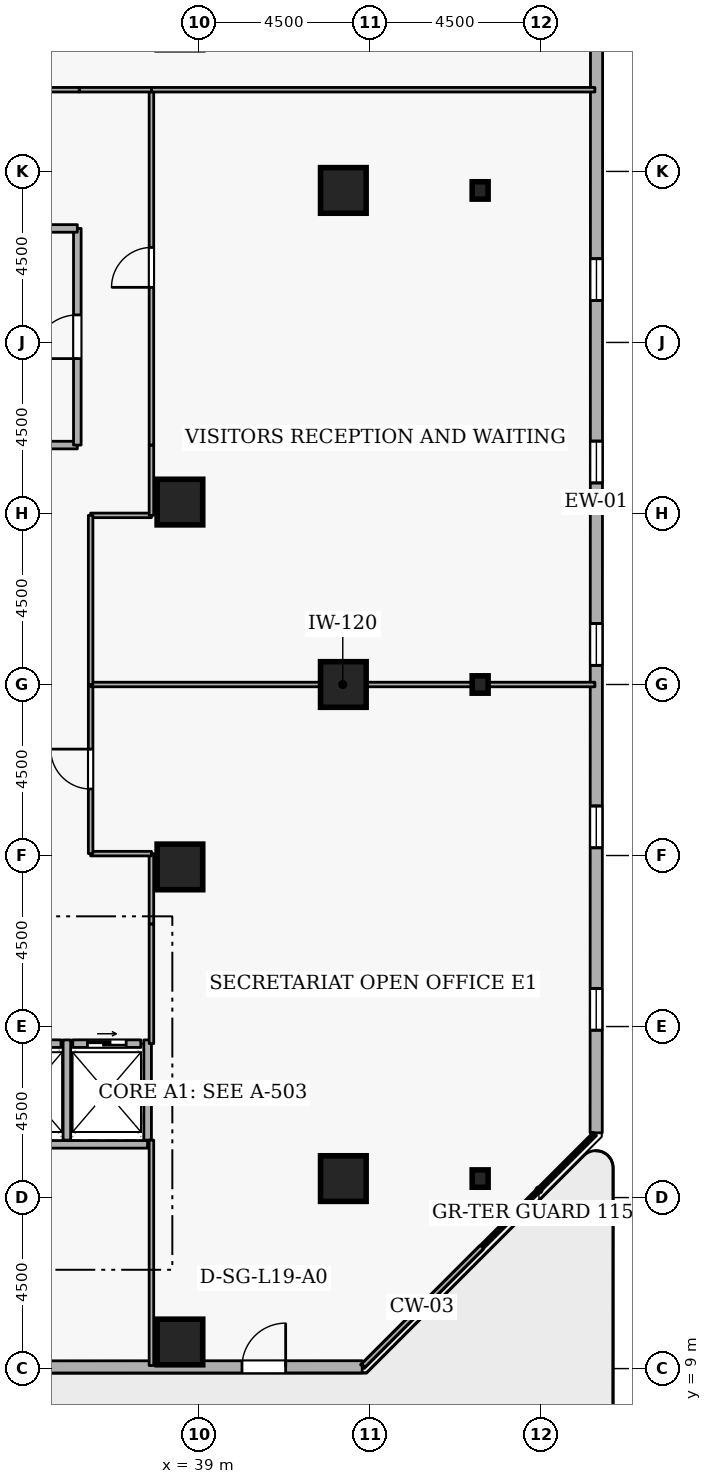
"""IFC4 building model, lengths in metres.
Left out: names, types, materials, properties, quantities, classifications, styles, units other than length and angle.
Written with IfcOpenShell. Run it as: python <this file> out.ifc"""

import sys

from ifc_helpers import new_model, si_unit, direction, frame, frame_2d, origin, origin_2d, place, context, subcontext, project, spatial, rectangle, i_section, extrude, element, fill, save


model = new_model("IFC4")
c1 = context("Model", 3, precision=1e-05, world=origin(), true_north=direction((0.0, 1.0)))
c2 = subcontext(c1, "Body", "Model", "MODEL_VIEW")
j1 = project(units=[si_unit("LENGTHUNIT", "METRE"), si_unit("PLANEANGLEUNIT", "RADIAN")], contexts=[c1])
p1 = place(None, origin())
s1 = spatial("IfcSite", under=j1, at=p1, CompositionType="ELEMENT")
p2 = place(p1, origin())
s2 = spatial("IfcBuilding", under=s1, at=p2, CompositionType="ELEMENT")
p3 = place(p2, frame((0.0, 0.0, 75.9)))
s3 = spatial("IfcBuildingStorey", under=s2, at=p3, CompositionType="ELEMENT", Elevation=75.9)
for number, where, z_axis, x_axis in (
    (1, (38.5, 9.7, 0.0), (0.0, 0.0, 1.0), (1.0, 0.0, 0.0)),
    (2, (42.8, 14.0, 0.0), (0.0, 0.0, 1.0), (1.0, 0.0, 0.0)),
    (3, (42.8, 27.0, 0.0), (0.0, 0.0, 1.0), (1.0, 0.0, 0.0)),
    (4, (42.8, 40.0, 0.0), (0.0, 0.0, 1.0), (1.0, 0.0, 0.0)),
    (5, (38.5, 22.2, 0.0), (0.0, 0.0, 1.0), (1.0, 0.0, 0.0)),
    (6, (38.5, 31.8, 0.0), (0.0, 0.0, 1.0), (1.0, 0.0, 0.0)),
):
    element("IfcColumn", number, at=place(p3, frame(where, z_axis=z_axis, x_axis=x_axis)), inside=s3, PredefinedType="COLUMN", context=c2, shape_type="SweptSolid", body=[
        extrude(rectangle(XDim=1.2, YDim=1.2, at=origin_2d()), origin(), (0.0, 0.0, 1.0), 4.2),
    ])
for number, where, z_axis, x_axis in (
    (7, (46.4, 14.0, 0.0), (0.0, 0.0, 1.0), (1.0, 0.0, 0.0)),
    (8, (46.4, 27.0, 0.0), (0.0, 0.0, 1.0), (1.0, 0.0, 0.0)),
    (9, (46.4, 40.0, 0.0), (0.0, 0.0, 1.0), (1.0, 0.0, 0.0)),
):
    element("IfcColumn", number, at=place(p3, frame(where, z_axis=z_axis, x_axis=x_axis)), inside=s3, PredefinedType="COLUMN", context=c2, shape_type="SweptSolid", body=[
        extrude(i_section(OverallWidth=0.418, OverallDepth=0.456, WebThickness=0.042, FlangeThickness=0.067, FilletRadius=0.015, at=origin_2d()), origin(), (0.0, 0.0, 1.0), 4.2),
    ])
p4 = place(p3, frame((10.119, 9.035, 0.0), z_axis=(0.0, 0.0, 1.0), x_axis=(0.99999993762, 0.000353213856, 0.0)))
e10 = element("IfcWall", 10, at=p4, inside=s3, PredefinedType="STANDARD", context=c2, shape_type="SweptSolid", body=[
    extrude(rectangle(XDim=33.177, YDim=0.32, at=frame_2d((16.589, 0.0))), origin(), (0.0, 0.0, 1.0), 3.3),
])
p5 = place(p4, frame((30.014, 0.0, 0.0)))
e11 = element("IfcOpeningElement", 11, at=p5, cuts=e10, PredefinedType="OPENING", context=c2, shape_type="SweptSolid", body=[
    extrude(rectangle(XDim=1.15, YDim=2.1, at=frame_2d((0.575, 1.05))), frame((0.0, 0.17, 0.0), z_axis=(0.0, -1.0, 0.0), x_axis=(1.0, 0.0, 0.0)), (0.0, 0.0, 1.0), 0.34),
])
p6 = place(p4, frame((7.5, 0.0, 0.72)))
e12 = element("IfcOpeningElement", 12, at=p6, cuts=e10, PredefinedType="OPENING", context=c2, shape_type="SweptSolid", body=[
    extrude(rectangle(XDim=1.1, YDim=1.8, at=frame_2d((0.55, 0.9))), frame((0.0, 0.17, 0.0), z_axis=(0.0, -1.0, 0.0), x_axis=(1.0, 0.0, 0.0)), (0.0, 0.0, 1.0), 0.34),
])
p7 = place(p4, frame((12.3, 0.0, 0.72)))
e13 = element("IfcOpeningElement", 13, at=p7, cuts=e10, PredefinedType="OPENING", context=c2, shape_type="SweptSolid", body=[
    extrude(rectangle(XDim=1.1, YDim=1.8, at=frame_2d((0.55, 0.9))), frame((0.0, 0.17, 0.0), z_axis=(0.0, -1.0, 0.0), x_axis=(1.0, 0.0, 0.0)), (0.0, 0.0, 1.0), 0.34),
])
p8 = place(p4, frame((17.1, 0.0, 0.72)))
e14 = element("IfcOpeningElement", 14, at=p8, cuts=e10, PredefinedType="OPENING", context=c2, shape_type="SweptSolid", body=[
    extrude(rectangle(XDim=1.1, YDim=1.8, at=frame_2d((0.55, 0.9))), frame((0.0, 0.17, 0.0), z_axis=(0.0, -1.0, 0.0), x_axis=(1.0, 0.0, 0.0)), (0.0, 0.0, 1.0), 0.34),
])
p9 = place(p4, frame((21.9, 0.0, 0.72)))
e15 = element("IfcOpeningElement", 15, at=p9, cuts=e10, PredefinedType="OPENING", context=c2, shape_type="SweptSolid", body=[
    extrude(rectangle(XDim=1.1, YDim=1.8, at=frame_2d((0.55, 0.9))), frame((0.0, 0.17, 0.0), z_axis=(0.0, -1.0, 0.0), x_axis=(1.0, 0.0, 0.0)), (0.0, 0.0, 1.0), 0.34),
])
p10 = place(p3, frame((49.453, 15.204, 0.0), z_axis=(0.0, 0.0, 1.0), x_axis=(0.000353213856, 0.99999993762, 0.0)))
e16 = element("IfcWall", 16, at=p10, inside=s3, PredefinedType="STANDARD", context=c2, shape_type="SweptSolid", body=[
    extrude(rectangle(XDim=33.177, YDim=0.32, at=frame_2d((16.589, 0.0))), origin(), (0.0, 0.0, 1.0), 3.3),
])
p11 = place(p10, frame((2.7, 0.0, 0.72)))
e17 = element("IfcOpeningElement", 17, at=p11, cuts=e16, PredefinedType="OPENING", context=c2, shape_type="SweptSolid", body=[
    extrude(rectangle(XDim=1.1, YDim=1.8, at=frame_2d((0.55, 0.9))), frame((0.0, 0.17, 0.0), z_axis=(0.0, -1.0, 0.0), x_axis=(1.0, 0.0, 0.0)), (0.0, 0.0, 1.0), 0.34),
])
p12 = place(p10, frame((7.5, 0.0, 0.72)))
e18 = element("IfcOpeningElement", 18, at=p12, cuts=e16, PredefinedType="OPENING", context=c2, shape_type="SweptSolid", body=[
    extrude(rectangle(XDim=1.1, YDim=1.8, at=frame_2d((0.55, 0.9))), frame((0.0, 0.17, 0.0), z_axis=(0.0, -1.0, 0.0), x_axis=(1.0, 0.0, 0.0)), (0.0, 0.0, 1.0), 0.34),
])
p13 = place(p10, frame((12.3, 0.0, 0.72)))
e19 = element("IfcOpeningElement", 19, at=p13, cuts=e16, PredefinedType="OPENING", context=c2, shape_type="SweptSolid", body=[
    extrude(rectangle(XDim=1.1, YDim=1.8, at=frame_2d((0.55, 0.9))), frame((0.0, 0.17, 0.0), z_axis=(0.0, -1.0, 0.0), x_axis=(1.0, 0.0, 0.0)), (0.0, 0.0, 1.0), 0.34),
])
p14 = place(p10, frame((17.1, 0.0, 0.72)))
e20 = element("IfcOpeningElement", 20, at=p14, cuts=e16, PredefinedType="OPENING", context=c2, shape_type="SweptSolid", body=[
    extrude(rectangle(XDim=1.1, YDim=1.8, at=frame_2d((0.55, 0.9))), frame((0.0, 0.17, 0.0), z_axis=(0.0, -1.0, 0.0), x_axis=(1.0, 0.0, 0.0)), (0.0, 0.0, 1.0), 0.34),
])
p15 = place(p10, frame((21.9, 0.0, 0.72)))
e21 = element("IfcOpeningElement", 21, at=p15, cuts=e16, PredefinedType="OPENING", context=c2, shape_type="SweptSolid", body=[
    extrude(rectangle(XDim=1.1, YDim=1.8, at=frame_2d((0.55, 0.9))), frame((0.0, 0.17, 0.0), z_axis=(0.0, -1.0, 0.0), x_axis=(1.0, 0.0, 0.0)), (0.0, 0.0, 1.0), 0.34),
])
p16 = place(p3, frame((33.63, 17.55, 0.0), z_axis=(0.0, 0.0, 1.0), x_axis=(1.0, 0.0, 0.0)))
e22 = element("IfcWall", 22, at=p16, inside=s3, PredefinedType="STANDARD", context=c2, shape_type="SweptSolid", body=[
    extrude(rectangle(XDim=1.74, YDim=0.2, at=frame_2d((0.87, 0.0))), origin(), (0.0, 0.0, 1.0), 3.94),
])
p17 = place(p16, frame((0.36, 0.0, 0.0)))
e23 = element("IfcOpeningElement", 23, at=p17, cuts=e22, PredefinedType="OPENING", context=c2, shape_type="SweptSolid", body=[
    extrude(rectangle(XDim=1.02, YDim=2.06, at=frame_2d((0.51, 1.03))), frame((0.0, 0.11, 0.0), z_axis=(0.0, -1.0, 0.0), x_axis=(1.0, 0.0, 0.0)), (0.0, 0.0, 1.0), 0.22),
])
p18 = place(p3, frame((35.68, 17.55, 0.0), z_axis=(0.0, 0.0, 1.0), x_axis=(1.0, 0.0, 0.0)))
e24 = element("IfcWall", 24, at=p18, inside=s3, PredefinedType="STANDARD", context=c2, shape_type="SweptSolid", body=[
    extrude(rectangle(XDim=1.79, YDim=0.2, at=frame_2d((0.895, 0.0))), origin(), (0.0, 0.0, 1.0), 3.94),
])
p19 = place(p18, frame((0.385, 0.0, 0.0)))
e25 = element("IfcOpeningElement", 25, at=p19, cuts=e24, PredefinedType="OPENING", context=c2, shape_type="SweptSolid", body=[
    extrude(rectangle(XDim=1.02, YDim=2.06, at=frame_2d((0.51, 1.03))), frame((0.0, 0.11, 0.0), z_axis=(0.0, -1.0, 0.0), x_axis=(1.0, 0.0, 0.0)), (0.0, 0.0, 1.0), 0.22),
])
p20 = place(p3, frame((33.452, 14.9, 0.0), z_axis=(0.0, 0.0, 1.0), x_axis=(1.0, 0.0, 0.0)))
e26 = element("IfcWall", 26, at=p20, inside=s3, PredefinedType="STANDARD", context=c2, shape_type="SweptSolid", body=[
    extrude(rectangle(XDim=4.196, YDim=0.2, at=frame_2d((2.098, 0.0))), origin(), (0.0, 0.0, 1.0), 3.94),
])
for number, where, z_axis, x_axis in (
    (27, (35.525, 15.012, 0.0), (0.0, 0.0, 1.0), (0.0, 1.0, 0.0)),
    (28, (37.65, 15.012, 0.0), (0.0, 0.0, 1.0), (0.0, 1.0, 0.0)),
):
    element("IfcWall", number, at=place(p3, frame(where, z_axis=z_axis, x_axis=x_axis)), inside=s3, PredefinedType="STANDARD", context=c2, shape_type="SweptSolid", body=[
        extrude(rectangle(XDim=2.636, YDim=0.2, at=frame_2d((1.318, 0.0))), origin(), (0.0, 0.0, 1.0), 3.94),
    ])
p21 = place(p3, frame((33.3, 33.3, 0.0), z_axis=(0.0, 0.0, 1.0), x_axis=(1.0, 0.0, 0.0)))
e29 = element("IfcWall", 29, at=p21, inside=s3, PredefinedType="STANDARD", context=c2, shape_type="SweptSolid", body=[
    extrude(rectangle(XDim=2.5, YDim=0.2, at=frame_2d((1.25, 0.0))), origin(), (0.0, 0.0, 1.0), 3.94),
])
p22 = place(p3, frame((35.8, 33.3, 0.0), z_axis=(0.0, 0.0, 1.0), x_axis=(0.0, 1.0, 0.0)))
e30 = element("IfcWall", 30, at=p22, inside=s3, PredefinedType="STANDARD", context=c2, shape_type="SweptSolid", body=[
    extrude(rectangle(XDim=5.7, YDim=0.2, at=frame_2d((2.85, 0.0))), origin(), (0.0, 0.0, 1.0), 3.94),
])
p23 = place(p22, frame((2.275, 0.0, 0.0)))
e31 = element("IfcOpeningElement", 31, at=p23, cuts=e30, PredefinedType="OPENING", context=c2, shape_type="SweptSolid", body=[
    extrude(rectangle(XDim=1.15, YDim=2.1, at=frame_2d((0.575, 1.05))), frame((0.0, 0.11, 0.0), z_axis=(0.0, -1.0, 0.0), x_axis=(1.0, 0.0, 0.0)), (0.0, 0.0, 1.0), 0.22),
])
p24 = place(p3, frame((35.8, 39.0, 0.0), z_axis=(0.0, 0.0, 1.0), x_axis=(-1.0, 0.0, 0.0)))
e32 = element("IfcWall", 32, at=p24, inside=s3, PredefinedType="STANDARD", context=c2, shape_type="SweptSolid", body=[
    extrude(rectangle(XDim=2.5, YDim=0.2, at=frame_2d((1.25, 0.0))), origin(), (0.0, 0.0, 1.0), 3.94),
])
p25 = place(p3, frame((37.75, 17.55, 0.0), z_axis=(0.0, 0.0, 1.0), x_axis=(0.0, 1.0, 0.0)))
e33 = element("IfcWall", 33, at=p25, inside=s3, PredefinedType="PARTITIONING", context=c2, shape_type="SweptSolid", body=[
    extrude(rectangle(XDim=3.15, YDim=0.12, at=frame_2d((1.575, 0.0))), origin(), (0.0, 0.0, 1.0), 3.94),
])
p26 = place(p3, frame((37.75, 20.7, 0.0), z_axis=(0.0, 0.0, 1.0), x_axis=(0.0, 1.0, 0.0)))
e34 = element("IfcWall", 34, at=p26, inside=s3, PredefinedType="PARTITIONING", context=c2, shape_type="SweptSolid", body=[
    extrude(rectangle(XDim=1.85, YDim=0.12, at=frame_2d((0.925, 0.0))), origin(), (0.0, 0.0, 1.0), 3.94),
])
p27 = place(p3, frame((37.75, 22.55, 0.0), z_axis=(0.0, 0.0, 1.0), x_axis=(-1.0, 0.0, 0.0)))
e35 = element("IfcWall", 35, at=p27, inside=s3, PredefinedType="PARTITIONING", context=c2, shape_type="SweptSolid", body=[
    extrude(rectangle(XDim=1.6, YDim=0.12, at=frame_2d((0.8, 0.0))), origin(), (0.0, 0.0, 1.0), 3.94),
])
p28 = place(p3, frame((36.15, 22.55, 0.0), z_axis=(0.0, 0.0, 1.0), x_axis=(0.0, 1.0, 0.0)))
e36 = element("IfcWall", 36, at=p28, inside=s3, PredefinedType="PARTITIONING", context=c2, shape_type="SweptSolid", body=[
    extrude(rectangle(XDim=4.45, YDim=0.12, at=frame_2d((2.225, 0.0))), origin(), (0.0, 0.0, 1.0), 3.94),
])
p29 = place(p28, frame((1.7, 0.0, 0.0)))
e37 = element("IfcOpeningElement", 37, at=p29, cuts=e36, PredefinedType="OPENING", context=c2, shape_type="SweptSolid", body=[
    extrude(rectangle(XDim=1.05, YDim=2.1, at=frame_2d((0.525, 1.05))), frame((0.0, 0.07, 0.0), z_axis=(0.0, -1.0, 0.0), x_axis=(1.0, 0.0, 0.0)), (0.0, 0.0, 1.0), 0.14),
])
p30 = place(p3, frame((36.15, 27.0, 0.0), z_axis=(0.0, 0.0, 1.0), x_axis=(1.0, 0.0, 0.0)))
e38 = element("IfcWall", 38, at=p30, inside=s3, PredefinedType="PARTITIONING", context=c2, shape_type="SweptSolid", body=[
    extrude(rectangle(XDim=13.27, YDim=0.12, at=frame_2d((6.635, 0.0))), origin(), (0.0, 0.0, 1.0), 3.482),
])
p31 = place(p3, frame((49.42, 15.175, 0.0), z_axis=(0.0, 0.0, 1.0), x_axis=(-0.707106781187, -0.707106781187, 0.0)))
e39 = element("IfcWall", 39, at=p31, inside=s3, PredefinedType="PARTITIONING", context=c2, shape_type="SweptSolid", body=[
    extrude(rectangle(XDim=8.619, YDim=0.12, at=frame_2d((4.31, 0.0))), origin(), (0.0, 0.0, 1.0), 3.94),
])
p32 = place(p3, frame((37.75, 9.08, 0.0), z_axis=(0.0, 0.0, 1.0), x_axis=(0.0, 1.0, 0.0)))
e40 = element("IfcWall", 40, at=p32, inside=s3, PredefinedType="PARTITIONING", context=c2, shape_type="SweptSolid", body=[
    extrude(rectangle(XDim=5.932, YDim=0.12, at=frame_2d((2.966, 0.0))), origin(), (0.0, 0.0, 1.0), 3.94),
])
p33 = place(p3, frame((36.15, 31.45, 0.0), z_axis=(0.0, 0.0, 1.0), x_axis=(1.0, 0.0, 0.0)))
e41 = element("IfcWall", 41, at=p33, inside=s3, PredefinedType="PARTITIONING", context=c2, shape_type="SweptSolid", body=[
    extrude(rectangle(XDim=1.6, YDim=0.12, at=frame_2d((0.8, 0.0))), origin(), (0.0, 0.0, 1.0), 3.94),
])
p34 = place(p3, frame((37.75, 31.45, 0.0), z_axis=(0.0, 0.0, 1.0), x_axis=(0.0, 1.0, 0.0)))
e42 = element("IfcWall", 42, at=p34, inside=s3, PredefinedType="PARTITIONING", context=c2, shape_type="SweptSolid", body=[
    extrude(rectangle(XDim=1.85, YDim=0.12, at=frame_2d((0.925, 0.0))), origin(), (0.0, 0.0, 1.0), 3.94),
])
p35 = place(p3, frame((37.75, 33.3, 0.0), z_axis=(0.0, 0.0, 1.0), x_axis=(0.0, 1.0, 0.0)))
e43 = element("IfcWall", 43, at=p35, inside=s3, PredefinedType="PARTITIONING", context=c2, shape_type="SweptSolid", body=[
    extrude(rectangle(XDim=9.35, YDim=0.12, at=frame_2d((4.675, 0.0))), origin(), (0.0, 0.0, 1.0), 3.94),
])
p36 = place(p35, frame((4.15, 0.0, 0.0)))
e44 = element("IfcOpeningElement", 44, at=p36, cuts=e43, PredefinedType="OPENING", context=c2, shape_type="SweptSolid", body=[
    extrude(rectangle(XDim=1.05, YDim=2.1, at=frame_2d((0.525, 1.05))), frame((0.0, 0.07, 0.0), z_axis=(0.0, -1.0, 0.0), x_axis=(1.0, 0.0, 0.0)), (0.0, 0.0, 1.0), 0.14),
])
p37 = place(p3, frame((37.75, 42.65, 0.0), z_axis=(0.0, 0.0, 1.0), x_axis=(1.0, 0.0, 0.0)))
e45 = element("IfcWall", 45, at=p37, inside=s3, PredefinedType="PARTITIONING", context=c2, shape_type="SweptSolid", body=[
    extrude(rectangle(XDim=11.67, YDim=0.12, at=frame_2d((5.835, 0.0))), origin(), (0.0, 0.0, 1.0), 3.94),
])
p38 = place(p3, frame((36.15, 27.0, 0.0), z_axis=(0.0, 0.0, 1.0), x_axis=(0.0, 1.0, 0.0)))
e46 = element("IfcWall", 46, at=p38, inside=s3, PredefinedType="PARTITIONING", context=c2, shape_type="SweptSolid", body=[
    extrude(rectangle(XDim=4.45, YDim=0.12, at=frame_2d((2.225, 0.0))), origin(), (0.0, 0.0, 1.0), 3.94),
])
p39 = place(p3, frame((37.75, 42.65, 0.0), z_axis=(0.0, 0.0, 1.0), x_axis=(-1.0, 0.0, 0.0)))
e47 = element("IfcWall", 47, at=p39, inside=s3, PredefinedType="PARTITIONING", context=c2, shape_type="SweptSolid", body=[
    extrude(rectangle(XDim=1.9, YDim=0.12, at=frame_2d((0.95, 0.0))), origin(), (0.0, 0.0, 1.0), 3.495),
])
p40 = place(p3, frame((35.85, 42.65, 0.0), z_axis=(0.0, 0.0, 1.0), x_axis=(-1.0, 0.0, 0.0)))
e48 = element("IfcWall", 48, at=p40, inside=s3, PredefinedType="PARTITIONING", context=c2, shape_type="SweptSolid", body=[
    extrude(rectangle(XDim=10.35, YDim=0.12, at=frame_2d((5.175, 0.0))), origin(), (0.0, 0.0, 1.0), 3.495),
])
p41 = place(p40, frame((4.65, 0.0, 0.0)))
e49 = element("IfcOpeningElement", 49, at=p41, cuts=e48, PredefinedType="OPENING", context=c2, shape_type="SweptSolid", body=[
    extrude(rectangle(XDim=1.05, YDim=2.1, at=frame_2d((0.525, 1.05))), frame((0.0, 0.07, 0.0), z_axis=(0.0, -1.0, 0.0), x_axis=(1.0, 0.0, 0.0)), (0.0, 0.0, 1.0), 0.14),
])
p42 = place(p5, origin())
e50 = element("IfcDoor", 50, at=p42, inside=s3, OperationType="SINGLE_SWING_RIGHT", PredefinedType="DOOR", context=c2, shape_type="SweptSolid", body=[
    extrude(rectangle(XDim=1.15, YDim=2.1, at=frame_2d((0.575, 1.05))), frame((0.0, 0.025, 0.0), z_axis=(0.0, -1.0, 0.0), x_axis=(1.0, 0.0, 0.0)), (0.0, 0.0, 1.0), 0.05),
])
fill(e11, e50)
p43 = place(p11, origin())
e51 = element("IfcWindow", 51, at=p43, inside=s3, PartitioningType="SINGLE_PANEL", PredefinedType="WINDOW", context=c2, shape_type="SweptSolid", body=[
    extrude(rectangle(XDim=1.1, YDim=1.8, at=frame_2d((0.55, 0.9))), frame((0.0, 0.03, 0.0), z_axis=(0.0, -1.0, 0.0), x_axis=(1.0, 0.0, 0.0)), (0.0, 0.0, 1.0), 0.06),
])
fill(e17, e51)
p44 = place(p12, origin())
e52 = element("IfcWindow", 52, at=p44, inside=s3, PartitioningType="SINGLE_PANEL", PredefinedType="WINDOW", context=c2, shape_type="SweptSolid", body=[
    extrude(rectangle(XDim=1.1, YDim=1.8, at=frame_2d((0.55, 0.9))), frame((0.0, 0.03, 0.0), z_axis=(0.0, -1.0, 0.0), x_axis=(1.0, 0.0, 0.0)), (0.0, 0.0, 1.0), 0.06),
])
fill(e18, e52)
p45 = place(p13, origin())
e53 = element("IfcWindow", 53, at=p45, inside=s3, PartitioningType="SINGLE_PANEL", PredefinedType="WINDOW", context=c2, shape_type="SweptSolid", body=[
    extrude(rectangle(XDim=1.1, YDim=1.8, at=frame_2d((0.55, 0.9))), frame((0.0, 0.03, 0.0), z_axis=(0.0, -1.0, 0.0), x_axis=(1.0, 0.0, 0.0)), (0.0, 0.0, 1.0), 0.06),
])
fill(e19, e53)
p46 = place(p14, origin())
e54 = element("IfcWindow", 54, at=p46, inside=s3, PartitioningType="SINGLE_PANEL", PredefinedType="WINDOW", context=c2, shape_type="SweptSolid", body=[
    extrude(rectangle(XDim=1.1, YDim=1.8, at=frame_2d((0.55, 0.9))), frame((0.0, 0.03, 0.0), z_axis=(0.0, -1.0, 0.0), x_axis=(1.0, 0.0, 0.0)), (0.0, 0.0, 1.0), 0.06),
])
fill(e20, e54)
p47 = place(p15, origin())
e55 = element("IfcWindow", 55, at=p47, inside=s3, PartitioningType="SINGLE_PANEL", PredefinedType="WINDOW", context=c2, shape_type="SweptSolid", body=[
    extrude(rectangle(XDim=1.1, YDim=1.8, at=frame_2d((0.55, 0.9))), frame((0.0, 0.03, 0.0), z_axis=(0.0, -1.0, 0.0), x_axis=(1.0, 0.0, 0.0)), (0.0, 0.0, 1.0), 0.06),
])
fill(e21, e55)
p48 = place(p19, origin())
e56 = element("IfcDoor", 56, at=p48, inside=s3, OperationType="SLIDING_TO_LEFT", PredefinedType="DOOR", context=c2, shape_type="SweptSolid", body=[
    extrude(rectangle(XDim=1.02, YDim=2.06, at=frame_2d((0.51, 1.03))), frame((0.0, 0.025, 0.0), z_axis=(0.0, -1.0, 0.0), x_axis=(1.0, 0.0, 0.0)), (0.0, 0.0, 1.0), 0.05),
])
fill(e25, e56)
p49 = place(p23, origin())
e57 = element("IfcDoor", 57, at=p49, inside=s3, OperationType="SINGLE_SWING_LEFT", PredefinedType="DOOR", context=c2, shape_type="SweptSolid", body=[
    extrude(rectangle(XDim=1.15, YDim=2.1, at=frame_2d((0.575, 1.05))), frame((0.0, 0.025, 0.0), z_axis=(0.0, -1.0, 0.0), x_axis=(1.0, 0.0, 0.0)), (0.0, 0.0, 1.0), 0.05),
])
fill(e31, e57)
p50 = place(p29, origin())
e58 = element("IfcDoor", 58, at=p50, inside=s3, OperationType="SINGLE_SWING_RIGHT", PredefinedType="DOOR", context=c2, shape_type="SweptSolid", body=[
    extrude(rectangle(XDim=1.05, YDim=2.1, at=frame_2d((0.525, 1.05))), frame((0.0, 0.025, 0.0), z_axis=(0.0, -1.0, 0.0), x_axis=(1.0, 0.0, 0.0)), (0.0, 0.0, 1.0), 0.05),
])
fill(e37, e58)
p51 = place(p36, origin())
e59 = element("IfcDoor", 59, at=p51, inside=s3, OperationType="SINGLE_SWING_LEFT", PredefinedType="DOOR", context=c2, shape_type="SweptSolid", body=[
    extrude(rectangle(XDim=1.05, YDim=2.1, at=frame_2d((0.525, 1.05))), frame((0.0, 0.025, 0.0), z_axis=(0.0, -1.0, 0.0), x_axis=(1.0, 0.0, 0.0)), (0.0, 0.0, 1.0), 0.05),
])
fill(e44, e59)
save(model, sys.argv[1])
